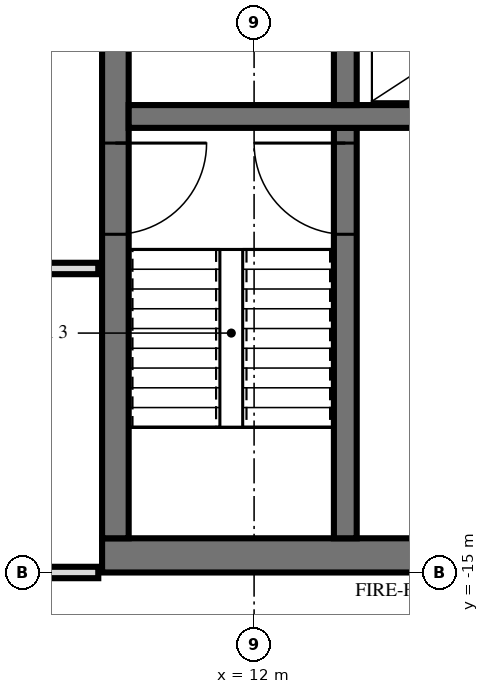
"""IFC4 building model, lengths in metres.
Left out: names, types, materials, properties, quantities, classifications, styles, units other than length and angle.
Written with IfcOpenShell. Run it as: python <this file> out.ifc"""

import sys

from ifc_helpers import new_model, si_unit, direction, frame, frame_2d, origin, place, context, subcontext, project, spatial, rectangle, extrude, element, fill, save


model = new_model("IFC4")
c1 = context("Model", 3, precision=1e-05, world=origin(), true_north=direction((0.0, 1.0)))
c2 = subcontext(c1, "Body", "Model", "MODEL_VIEW")
j1 = project(units=[si_unit("LENGTHUNIT", "METRE"), si_unit("PLANEANGLEUNIT", "RADIAN")], contexts=[c1])
p1 = place(None, origin())
s1 = spatial("IfcSite", under=j1, at=p1, CompositionType="ELEMENT")
p2 = place(p1, origin())
s2 = spatial("IfcBuilding", under=s1, at=p2, CompositionType="ELEMENT")
p3 = place(p2, frame((0.0, 0.0, 88.8)))
s3 = spatial("IfcBuildingStorey", under=s2, at=p3, CompositionType="ELEMENT", Elevation=88.8)
p4 = place(p3, frame((10.0, -14.775, 0.0), z_axis=(0.0, 0.0, 1.0), x_axis=(1.0, 0.0, 0.0)))
e1 = element("IfcWall", 1, at=p4, inside=s3, PredefinedType="SHEAR", context=c2, shape_type="SweptSolid", body=[
    extrude(rectangle(XDim=19.5, YDim=0.45, at=frame_2d((9.75, 0.0))), origin(), (0.0, 0.0, 1.0), 3.6),
])
p5 = place(p4, frame((7.1, 0.0, 0.0)))
e2 = element("IfcOpeningElement", 2, at=p5, cuts=e1, PredefinedType="OPENING", context=c2, shape_type="SweptSolid", body=[
    extrude(rectangle(XDim=1.2, YDim=2.1, at=frame_2d((0.6, 1.05))), frame((0.0, 0.235, 0.0), z_axis=(0.0, -1.0, 0.0), x_axis=(1.0, 0.0, 0.0)), (0.0, 0.0, 1.0), 0.47),
])
p6 = place(p4, frame((4.15, 0.0, 0.0)))
e3 = element("IfcOpeningElement", 3, at=p6, cuts=e1, PredefinedType="OPENING", context=c2, shape_type="SweptSolid", body=[
    extrude(rectangle(XDim=1.1, YDim=2.1, at=frame_2d((0.55, 1.05))), frame((0.0, 0.235, 0.0), z_axis=(0.0, -1.0, 0.0), x_axis=(1.0, 0.0, 0.0)), (0.0, 0.0, 1.0), 0.47),
])
p7 = place(p4, frame((10.1, 0.0, 0.0)))
e4 = element("IfcOpeningElement", 4, at=p7, cuts=e1, PredefinedType="OPENING", context=c2, shape_type="SweptSolid", body=[
    extrude(rectangle(XDim=0.9, YDim=2.1, at=frame_2d((0.45, 1.05))), frame((0.0, 0.235, 0.0), z_axis=(0.0, -1.0, 0.0), x_axis=(1.0, 0.0, 0.0)), (0.0, 0.0, 1.0), 0.47),
])
p8 = place(p4, frame((12.45, 0.0, 0.0)))
e5 = element("IfcOpeningElement", 5, at=p8, cuts=e1, PredefinedType="OPENING", context=c2, shape_type="SweptSolid", body=[
    extrude(rectangle(XDim=1.0, YDim=2.1, at=frame_2d((0.5, 1.05))), frame((0.0, 0.235, 0.0), z_axis=(0.0, -1.0, 0.0), x_axis=(1.0, 0.0, 0.0)), (0.0, 0.0, 1.0), 0.47),
])
p9 = place(p4, frame((14.913, 0.0, 0.0)))
e6 = element("IfcOpeningElement", 6, at=p9, cuts=e1, PredefinedType="OPENING", context=c2, shape_type="SweptSolid", body=[
    extrude(rectangle(XDim=1.0, YDim=2.1, at=frame_2d((0.5, 1.05))), frame((0.0, 0.235, 0.0), z_axis=(0.0, -1.0, 0.0), x_axis=(1.0, 0.0, 0.0)), (0.0, 0.0, 1.0), 0.47),
])
p10 = place(p4, frame((16.65, 0.0, 0.0)))
e7 = element("IfcOpeningElement", 7, at=p10, cuts=e1, PredefinedType="OPENING", context=c2, shape_type="SweptSolid", body=[
    extrude(rectangle(XDim=1.0, YDim=2.1, at=frame_2d((0.5, 1.05))), frame((0.0, 0.235, 0.0), z_axis=(0.0, -1.0, 0.0), x_axis=(1.0, 0.0, 0.0)), (0.0, 0.0, 1.0), 0.47),
])
p11 = place(p4, frame((18.025, 0.0, 0.0)))
e8 = element("IfcOpeningElement", 8, at=p11, cuts=e1, PredefinedType="OPENING", context=c2, shape_type="SweptSolid", body=[
    extrude(rectangle(XDim=1.0, YDim=2.1, at=frame_2d((0.5, 1.05))), frame((0.0, 0.235, 0.0), z_axis=(0.0, -1.0, 0.0), x_axis=(1.0, 0.0, 0.0)), (0.0, 0.0, 1.0), 0.47),
])
p12 = place(p3, frame((10.175, -14.55, 0.0), z_axis=(0.0, 0.0, 1.0), x_axis=(0.0, 1.0, 0.0)))
e9 = element("IfcWall", 9, at=p12, inside=s3, PredefinedType="SHEAR", context=c2, shape_type="SweptSolid", body=[
    extrude(rectangle(XDim=14.1, YDim=0.35, at=frame_2d((7.05, 0.0))), origin(), (0.0, 0.0, 1.0), 3.6),
])
p13 = place(p12, frame((8.4, 0.0, 0.0)))
e10 = element("IfcOpeningElement", 10, at=p13, cuts=e9, PredefinedType="OPENING", context=c2, shape_type="SweptSolid", body=[
    extrude(rectangle(XDim=1.4, YDim=2.4, at=frame_2d((0.7, 1.2))), frame((0.0, 0.185, 0.0), z_axis=(0.0, -1.0, 0.0), x_axis=(1.0, 0.0, 0.0)), (0.0, 0.0, 1.0), 0.37),
])
p14 = place(p12, frame((10.0, 0.0, 0.0)))
e11 = element("IfcOpeningElement", 11, at=p14, cuts=e9, PredefinedType="OPENING", context=c2, shape_type="SweptSolid", body=[
    extrude(rectangle(XDim=1.4, YDim=2.4, at=frame_2d((0.7, 1.2))), frame((0.0, 0.185, 0.0), z_axis=(0.0, -1.0, 0.0), x_axis=(1.0, 0.0, 0.0)), (0.0, 0.0, 1.0), 0.37),
])
p15 = place(p12, frame((4.0, 0.0, 0.0)))
e12 = element("IfcOpeningElement", 12, at=p15, cuts=e9, PredefinedType="OPENING", context=c2, shape_type="SweptSolid", body=[
    extrude(rectangle(XDim=1.2, YDim=2.1, at=frame_2d((0.6, 1.05))), frame((0.0, 0.185, 0.0), z_axis=(0.0, -1.0, 0.0), x_axis=(1.0, 0.0, 0.0)), (0.0, 0.0, 1.0), 0.37),
])
p16 = place(p3, frame((10.35, -9.0, 0.0), z_axis=(0.0, 0.0, 1.0), x_axis=(1.0, 0.0, 0.0)))
e13 = element("IfcWall", 13, at=p16, inside=s3, PredefinedType="SHEAR", context=c2, shape_type="SweptSolid", body=[
    extrude(rectangle(XDim=18.7, YDim=0.3, at=frame_2d((9.35, 0.0))), origin(), (0.0, 0.0, 1.0), 3.6),
])
p17 = place(p16, frame((3.8, 0.0, 0.0)))
e14 = element("IfcOpeningElement", 14, at=p17, cuts=e13, PredefinedType="OPENING", context=c2, shape_type="SweptSolid", body=[
    extrude(rectangle(XDim=1.1, YDim=2.1, at=frame_2d((0.55, 1.05))), frame((0.0, 0.16, 0.0), z_axis=(0.0, -1.0, 0.0), x_axis=(1.0, 0.0, 0.0)), (0.0, 0.0, 1.0), 0.32),
])
p18 = place(p3, frame((13.2, -8.85, 0.0), z_axis=(0.0, 0.0, 1.0), x_axis=(0.0, 1.0, 0.0)))
e15 = element("IfcWall", 15, at=p18, inside=s3, PredefinedType="SHEAR", context=c2, shape_type="SweptSolid", body=[
    extrude(rectangle(XDim=2.3, YDim=0.3, at=frame_2d((1.15, 0.0))), origin(), (0.0, 0.0, 1.0), 3.6),
])
p19 = place(p3, frame((13.2, -14.55, 0.0), z_axis=(0.0, 0.0, 1.0), x_axis=(0.0, 1.0, 0.0)))
e16 = element("IfcWall", 16, at=p19, inside=s3, PredefinedType="SHEAR", context=c2, shape_type="SweptSolid", body=[
    extrude(rectangle(XDim=5.4, YDim=0.3, at=frame_2d((2.7, 0.0))), origin(), (0.0, 0.0, 1.0), 3.6),
])
p20 = place(p19, frame((4.0, 0.0, 0.0)))
e17 = element("IfcOpeningElement", 17, at=p20, cuts=e16, PredefinedType="OPENING", context=c2, shape_type="SweptSolid", body=[
    extrude(rectangle(XDim=1.2, YDim=2.1, at=frame_2d((0.6, 1.05))), frame((0.0, 0.16, 0.0), z_axis=(0.0, -1.0, 0.0), x_axis=(1.0, 0.0, 0.0)), (0.0, 0.0, 1.0), 0.32),
])
p21 = place(p3, frame((-9.95, -15.0, 0.0), z_axis=(0.0, 0.0, 1.0), x_axis=(1.0, 0.0, 0.0)))
e18 = element("IfcWall", 18, at=p21, inside=s3, PredefinedType="PARTITIONING", context=c2, shape_type="SweptSolid", body=[
    extrude(rectangle(XDim=19.9, YDim=0.15, at=frame_2d((9.95, 0.0))), origin(), (0.0, 0.0, 1.0), 2.684),
])
p22 = place(p21, frame((9.45, 0.0, 0.0)))
e19 = element("IfcOpeningElement", 19, at=p22, cuts=e18, PredefinedType="OPENING", context=c2, shape_type="SweptSolid", body=[
    extrude(rectangle(XDim=1.0, YDim=2.1, at=frame_2d((0.5, 1.05))), frame((0.0, 0.085, 0.0), z_axis=(0.0, -1.0, 0.0), x_axis=(1.0, 0.0, 0.0)), (0.0, 0.0, 1.0), 0.17),
])
p23 = place(p3, frame((-9.95, -11.0, 0.0), z_axis=(0.0, 0.0, 1.0), x_axis=(1.0, 0.0, 0.0)))
e20 = element("IfcWall", 20, at=p23, inside=s3, PredefinedType="PARTITIONING", context=c2, shape_type="SweptSolid", body=[
    extrude(rectangle(XDim=19.9, YDim=0.15, at=frame_2d((9.95, 0.0))), origin(), (0.0, 0.0, 1.0), 3.32),
])
p24 = place(p23, frame((9.45, 0.0, 0.0)))
e21 = element("IfcOpeningElement", 21, at=p24, cuts=e20, PredefinedType="OPENING", context=c2, shape_type="SweptSolid", body=[
    extrude(rectangle(XDim=1.0, YDim=2.1, at=frame_2d((0.5, 1.05))), frame((0.0, 0.085, 0.0), z_axis=(0.0, -1.0, 0.0), x_axis=(1.0, 0.0, 0.0)), (0.0, 0.0, 1.0), 0.17),
])
p25 = place(p23, frame((15.45, 0.0, 0.0)))
e22 = element("IfcOpeningElement", 22, at=p25, cuts=e20, PredefinedType="OPENING", context=c2, shape_type="SweptSolid", body=[
    extrude(rectangle(XDim=1.0, YDim=2.1, at=frame_2d((0.5, 1.05))), frame((0.0, 0.085, 0.0), z_axis=(0.0, -1.0, 0.0), x_axis=(1.0, 0.0, 0.0)), (0.0, 0.0, 1.0), 0.17),
])
p26 = place(p15, frame((0.6, 0.0, 0.0), z_axis=(0.0, 0.0, 1.0), x_axis=(-1.0, 0.0, 0.0)))
e23 = element("IfcDoor", 23, at=p26, inside=s3, OperationType="SINGLE_SWING_RIGHT", PredefinedType="DOOR", context=c2, shape_type="SweptSolid", body=[
    extrude(rectangle(XDim=1.2, YDim=2.1, at=frame_2d((0.0, 1.05))), frame((0.0, -0.025, 0.0), z_axis=(0.0, 1.0, 0.0), x_axis=(-1.0, 0.0, 0.0)), (0.0, 0.0, 1.0), 0.05),
])
fill(e12, e23)
p27 = place(p20, origin())
e24 = element("IfcDoor", 24, at=p27, inside=s3, OperationType="SINGLE_SWING_LEFT", PredefinedType="DOOR", context=c2, shape_type="SweptSolid", body=[
    extrude(rectangle(XDim=1.2, YDim=2.1, at=frame_2d((0.6, 1.05))), frame((0.0, 0.025, 0.0), z_axis=(0.0, -1.0, 0.0), x_axis=(1.0, 0.0, 0.0)), (0.0, 0.0, 1.0), 0.05),
])
fill(e17, e24)
save(model, sys.argv[1])
